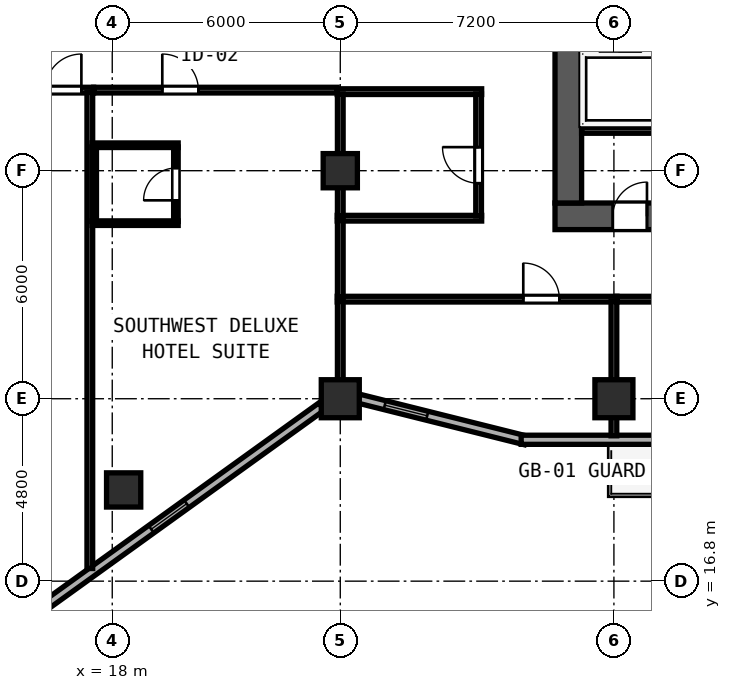
"""IFC4 building model, lengths in metres.
Left out: names, types, materials, properties, quantities, classifications, styles, units other than length and angle.
Written with IfcOpenShell. Run it as: python <this file> out.ifc"""

import sys

from ifc_helpers import new_model, si_unit, direction, frame, frame_2d, origin, origin_2d, place, context, subcontext, project, spatial, rectangle, hollow_rectangle, extrude, element, fill, save


model = new_model("IFC4")
c1 = context("Model", 3, precision=1e-05, world=origin(), true_north=direction((0.0, 1.0)))
c2 = subcontext(c1, "Body", "Model", "MODEL_VIEW")
j1 = project(units=[si_unit("LENGTHUNIT", "METRE"), si_unit("PLANEANGLEUNIT", "RADIAN")], contexts=[c1])
p1 = place(None, origin())
s1 = spatial("IfcSite", under=j1, at=p1, CompositionType="ELEMENT")
p2 = place(p1, origin())
s2 = spatial("IfcBuilding", under=s1, at=p2, CompositionType="ELEMENT")
p3 = place(p2, frame((0.0, 0.0, 113.6)))
s3 = spatial("IfcBuildingStorey", under=s2, at=p3, CompositionType="ELEMENT", Elevation=113.6)
p4 = place(p3, frame((29.65, 26.4, 0.0), z_axis=(0.0, 0.0, 1.0), x_axis=(1.0, 0.0, 0.0)))
e1 = element("IfcWall", 1, at=p4, inside=s3, PredefinedType="SHEAR", context=c2, shape_type="SweptSolid", body=[
    extrude(rectangle(XDim=17.5, YDim=0.7, at=frame_2d((8.75, 0.0))), origin(), (0.0, 0.0, 1.0), 3.6),
])
p5 = place(p4, frame((2.42, 0.0, 0.0), z_axis=(0.0, 0.0, 1.0), x_axis=(-1.0, 0.0, 0.0)))
e2 = element("IfcOpeningElement", 2, at=p5, cuts=e1, PredefinedType="OPENING", context=c2, shape_type="SweptSolid", body=[
    extrude(rectangle(XDim=0.9, YDim=2.1, at=frame_2d((0.45, 1.05))), frame((0.0, 0.36, 0.0), z_axis=(0.0, -1.0, 0.0), x_axis=(1.0, 0.0, 0.0)), (0.0, 0.0, 1.0), 0.72),
])
p6 = place(p4, frame((7.26, 0.0, 0.0), z_axis=(0.0, 0.0, 1.0), x_axis=(-1.0, 0.0, 0.0)))
e3 = element("IfcOpeningElement", 3, at=p6, cuts=e1, PredefinedType="OPENING", context=c2, shape_type="SweptSolid", body=[
    extrude(rectangle(XDim=0.9, YDim=2.1, at=frame_2d((0.45, 1.05))), frame((0.0, 0.36, 0.0), z_axis=(0.0, -1.0, 0.0), x_axis=(1.0, 0.0, 0.0)), (0.0, 0.0, 1.0), 0.72),
])
p7 = place(p4, frame((13.06, 0.0, 0.0), z_axis=(0.0, 0.0, 1.0), x_axis=(-1.0, 0.0, 0.0)))
e4 = element("IfcOpeningElement", 4, at=p7, cuts=e1, PredefinedType="OPENING", context=c2, shape_type="SweptSolid", body=[
    extrude(rectangle(XDim=0.9, YDim=2.1, at=frame_2d((0.45, 1.05))), frame((0.0, 0.36, 0.0), z_axis=(0.0, -1.0, 0.0), x_axis=(1.0, 0.0, 0.0)), (0.0, 0.0, 1.0), 0.72),
])
p8 = place(p3, frame((30.0, 26.75, 0.0), z_axis=(0.0, 0.0, 1.0), x_axis=(0.0, 1.0, 0.0)))
e5 = element("IfcWall", 5, at=p8, inside=s3, PredefinedType="SHEAR", context=c2, shape_type="SweptSolid", body=[
    extrude(rectangle(XDim=4.1, YDim=0.7, at=frame_2d((2.05, 0.0))), origin(), (0.0, 0.0, 1.0), 3.6),
])
for number, where, z_axis, x_axis in (
    (6, (24.0, 21.6, 0.0), (0.0, 0.0, 1.0), (1.0, 0.0, 0.0)),
    (7, (31.2, 21.6, 0.0), (0.0, 0.0, 1.0), (1.0, 0.0, 0.0)),
):
    element("IfcColumn", number, at=place(p3, frame(where, z_axis=z_axis, x_axis=x_axis)), inside=s3, PredefinedType="COLUMN", context=c2, shape_type="SweptSolid", body=[
        extrude(hollow_rectangle(XDim=1.0, YDim=1.0, WallThickness=0.038, at=origin_2d()), origin(), (0.0, 0.0, 1.0), 3.8),
    ])
for number, where, z_axis, x_axis in (
    (8, (24.0, 27.6, 0.0), (0.0, 0.0, 1.0), (1.0, 0.0, 0.0)),
    (9, (18.3, 19.2, 0.0), (0.0, 0.0, 1.0), (1.0, 0.0, 0.0)),
):
    element("IfcColumn", number, at=place(p3, frame(where, z_axis=z_axis, x_axis=x_axis)), inside=s3, PredefinedType="COLUMN", context=c2, shape_type="SweptSolid", body=[
        extrude(hollow_rectangle(XDim=0.9, YDim=0.9, WallThickness=0.034, at=origin_2d()), origin(), (0.0, 0.0, 1.0), 3.8),
    ])
p9 = place(p3, frame((14.075, 14.602, 0.0), z_axis=(0.0, 0.0, 1.0), x_axis=(0.811543504691, 0.584291998913, 0.0)))
e10 = element("IfcWall", 10, at=p9, inside=s3, PredefinedType="SOLIDWALL", context=c2, shape_type="SweptSolid", body=[
    extrude(rectangle(XDim=11.623, YDim=0.24, at=frame_2d((5.812, 0.0))), origin(), (0.0, 0.0, 1.0), 3.145),
])
p10 = place(p9, frame((0.7, 0.0, 0.85)))
e11 = element("IfcOpeningElement", 11, at=p10, cuts=e10, PredefinedType="OPENING", context=c2, shape_type="SweptSolid", body=[
    extrude(rectangle(XDim=1.15, YDim=1.8, at=frame_2d((0.575, 0.9))), frame((0.0, 0.13, 0.0), z_axis=(0.0, -1.0, 0.0), x_axis=(1.0, 0.0, 0.0)), (0.0, 0.0, 1.0), 0.26),
])
p11 = place(p9, frame((6.1, 0.0, 0.85)))
e12 = element("IfcOpeningElement", 12, at=p11, cuts=e10, PredefinedType="OPENING", context=c2, shape_type="SweptSolid", body=[
    extrude(rectangle(XDim=1.15, YDim=1.8, at=frame_2d((0.575, 0.9))), frame((0.0, 0.13, 0.0), z_axis=(0.0, -1.0, 0.0), x_axis=(1.0, 0.0, 0.0)), (0.0, 0.0, 1.0), 0.26),
])
p12 = place(p3, frame((24.492, 21.601, 0.0), z_axis=(0.0, 0.0, 1.0), x_axis=(0.970145683738, -0.242522890311, 0.0)))
e13 = element("IfcWall", 13, at=p12, inside=s3, PredefinedType="SOLIDWALL", context=c2, shape_type="SweptSolid", body=[
    extrude(rectangle(XDim=4.511, YDim=0.24, at=frame_2d((2.255, 0.0))), origin(), (0.0, 0.0, 1.0), 3.145),
])
p13 = place(p12, frame((0.7, 0.0, 0.85)))
e14 = element("IfcOpeningElement", 14, at=p13, cuts=e13, PredefinedType="OPENING", context=c2, shape_type="SweptSolid", body=[
    extrude(rectangle(XDim=1.15, YDim=1.8, at=frame_2d((0.575, 0.9))), frame((0.0, 0.13, 0.0), z_axis=(0.0, -1.0, 0.0), x_axis=(1.0, 0.0, 0.0)), (0.0, 0.0, 1.0), 0.26),
])
p14 = place(p3, frame((28.76, 20.52, 0.0), z_axis=(0.0, 0.0, 1.0), x_axis=(1.0, 0.0, 0.0)))
e15 = element("IfcWall", 15, at=p14, inside=s3, PredefinedType="SOLIDWALL", context=c2, shape_type="SweptSolid", body=[
    extrude(rectangle(XDim=19.281, YDim=0.24, at=frame_2d((9.64, 0.0))), origin(), (0.0, 0.0, 1.0), 3.6),
])
p15 = place(p14, frame((4.84, 0.0, 0.0), z_axis=(0.0, 0.0, 1.0), x_axis=(-1.0, 0.0, 0.0)))
e16 = element("IfcOpeningElement", 16, at=p15, cuts=e15, PredefinedType="OPENING", context=c2, shape_type="SweptSolid", body=[
    extrude(rectangle(XDim=1.2, YDim=2.15, at=frame_2d((0.6, 1.075))), frame((0.0, 0.13, 0.0), z_axis=(0.0, -1.0, 0.0), x_axis=(1.0, 0.0, 0.0)), (0.0, 0.0, 1.0), 0.26),
])
p16 = place(p3, frame((30.35, 28.66, 0.0), z_axis=(0.0, 0.0, 1.0), x_axis=(1.0, 0.0, 0.0)))
e17 = element("IfcWall", 17, at=p16, inside=s3, PredefinedType="PARTITIONING", context=c2, shape_type="SweptSolid", body=[
    extrude(rectangle(XDim=16.1, YDim=0.15, at=frame_2d((8.05, 0.0))), origin(), (0.0, 0.0, 1.0), 3.6),
])
for number, where, z_axis, x_axis in (
    (18, (23.92, 29.68, 0.0), (0.0, 0.0, 1.0), (1.0, 0.0, 0.0)),
    (19, (23.92, 26.35, 0.0), (0.0, 0.0, 1.0), (1.0, 0.0, 0.0)),
):
    element("IfcWall", number, at=place(p3, frame(where, z_axis=z_axis, x_axis=x_axis)), inside=s3, PredefinedType="PARTITIONING", context=c2, shape_type="SweptSolid", body=[
        extrude(rectangle(XDim=3.8, YDim=0.15, at=frame_2d((1.9, 0.0))), origin(), (0.0, 0.0, 1.0), 3.6),
    ])
p17 = place(p3, frame((24.0, 26.41, 0.0), z_axis=(0.0, 0.0, 1.0), x_axis=(0.0, 1.0, 0.0)))
e20 = element("IfcWall", 20, at=p17, inside=s3, PredefinedType="PARTITIONING", context=c2, shape_type="SweptSolid", body=[
    extrude(rectangle(XDim=3.21, YDim=0.15, at=frame_2d((1.605, 0.0))), origin(), (0.0, 0.0, 1.0), 3.145),
])
p18 = place(p3, frame((27.64, 26.41, 0.0), z_axis=(0.0, 0.0, 1.0), x_axis=(0.0, 1.0, 0.0)))
e21 = element("IfcWall", 21, at=p18, inside=s3, PredefinedType="PARTITIONING", context=c2, shape_type="SweptSolid", body=[
    extrude(rectangle(XDim=3.21, YDim=0.15, at=frame_2d((1.605, 0.0))), origin(), (0.0, 0.0, 1.0), 3.6),
])
p19 = place(p18, frame((1.81, 0.0, 0.0), z_axis=(0.0, 0.0, 1.0), x_axis=(-1.0, 0.0, 0.0)))
e22 = element("IfcOpeningElement", 22, at=p19, cuts=e21, PredefinedType="OPENING", context=c2, shape_type="SweptSolid", body=[
    extrude(rectangle(XDim=0.95, YDim=2.12, at=frame_2d((0.475, 1.06))), frame((0.0, 0.085, 0.0), z_axis=(0.0, -1.0, 0.0), x_axis=(1.0, 0.0, 0.0)), (0.0, 0.0, 1.0), 0.17),
])
p20 = place(p3, frame((23.92, 24.22, 0.0), z_axis=(0.0, 0.0, 1.0), x_axis=(1.0, 0.0, 0.0)))
e23 = element("IfcWall", 23, at=p20, inside=s3, PredefinedType="PARTITIONING", context=c2, shape_type="SweptSolid", body=[
    extrude(rectangle(XDim=7.36, YDim=0.15, at=frame_2d((3.68, 0.0))), origin(), (0.0, 0.0, 1.0), 3.6),
])
p21 = place(p20, frame((5.845, 0.0, 0.0), z_axis=(0.0, 0.0, 1.0), x_axis=(-1.0, 0.0, 0.0)))
e24 = element("IfcOpeningElement", 24, at=p21, cuts=e23, PredefinedType="OPENING", context=c2, shape_type="SweptSolid", body=[
    extrude(rectangle(XDim=0.95, YDim=2.12, at=frame_2d((0.475, 1.06))), frame((0.0, 0.085, 0.0), z_axis=(0.0, -1.0, 0.0), x_axis=(1.0, 0.0, 0.0)), (0.0, 0.0, 1.0), 0.17),
])
p22 = place(p3, frame((24.0, 21.819, 0.0), z_axis=(0.0, 0.0, 1.0), x_axis=(0.0, 1.0, 0.0)))
e25 = element("IfcWall", 25, at=p22, inside=s3, PredefinedType="PARTITIONING", context=c2, shape_type="SweptSolid", body=[
    extrude(rectangle(XDim=2.341, YDim=0.15, at=frame_2d((1.171, 0.0))), origin(), (0.0, 0.0, 1.0), 3.145),
])
p23 = place(p3, frame((31.2, 20.625, 0.0), z_axis=(0.0, 0.0, 1.0), x_axis=(0.0, 1.0, 0.0)))
e26 = element("IfcWall", 26, at=p23, inside=s3, PredefinedType="PARTITIONING", context=c2, shape_type="SweptSolid", body=[
    extrude(rectangle(XDim=3.535, YDim=0.15, at=frame_2d((1.768, 0.0))), origin(), (0.0, 0.0, 1.0), 3.085),
])
p24 = place(p3, frame((31.282, 24.22, 0.0), z_axis=(0.0, 0.0, 1.0), x_axis=(1.0, 0.0, 0.0)))
e27 = element("IfcWall", 27, at=p24, inside=s3, PredefinedType="PARTITIONING", context=c2, shape_type="SweptSolid", body=[
    extrude(rectangle(XDim=14.398, YDim=0.15, at=frame_2d((7.199, 0.0))), origin(), (0.0, 0.0, 1.0), 3.6),
])
p25 = place(p24, frame((7.513, 0.0, 0.0), z_axis=(0.0, 0.0, 1.0), x_axis=(-1.0, 0.0, 0.0)))
e28 = element("IfcOpeningElement", 28, at=p25, cuts=e27, PredefinedType="OPENING", context=c2, shape_type="SweptSolid", body=[
    extrude(rectangle(XDim=0.95, YDim=2.12, at=frame_2d((0.475, 1.06))), frame((0.0, 0.085, 0.0), z_axis=(0.0, -1.0, 0.0), x_axis=(1.0, 0.0, 0.0)), (0.0, 0.0, 1.0), 0.17),
])
p26 = place(p3, frame((11.7, 29.72, 0.0), z_axis=(0.0, 0.0, 1.0), x_axis=(1.0, 0.0, 0.0)))
e29 = element("IfcWall", 29, at=p26, inside=s3, PredefinedType="PARTITIONING", context=c2, shape_type="SweptSolid", body=[
    extrude(rectangle(XDim=5.81, YDim=0.15, at=frame_2d((2.905, 0.0))), origin(), (0.0, 0.0, 1.0), 3.6),
])
p27 = place(p26, frame((5.488, 0.0, 0.0), z_axis=(0.0, 0.0, 1.0), x_axis=(-1.0, 0.0, 0.0)))
e30 = element("IfcOpeningElement", 30, at=p27, cuts=e29, PredefinedType="OPENING", context=c2, shape_type="SweptSolid", body=[
    extrude(rectangle(XDim=0.95, YDim=2.18, at=frame_2d((0.475, 1.09))), frame((0.0, 0.085, 0.0), z_axis=(0.0, -1.0, 0.0), x_axis=(1.0, 0.0, 0.0)), (0.0, 0.0, 1.0), 0.17),
])
p28 = place(p3, frame((17.41, 17.133, 0.0), z_axis=(0.0, 0.0, 1.0), x_axis=(0.0, 1.0, 0.0)))
e31 = element("IfcWall", 31, at=p28, inside=s3, PredefinedType="PARTITIONING", context=c2, shape_type="SweptSolid", body=[
    extrude(rectangle(XDim=12.527, YDim=0.15, at=frame_2d((6.264, 0.0))), origin(), (0.0, 0.0, 1.0), 3.6),
])
p29 = place(p3, frame((17.512, 29.72, 0.0), z_axis=(0.0, 0.0, 1.0), x_axis=(1.0, 0.0, 0.0)))
e32 = element("IfcWall", 32, at=p29, inside=s3, PredefinedType="PARTITIONING", context=c2, shape_type="SweptSolid", body=[
    extrude(rectangle(XDim=6.406, YDim=0.15, at=frame_2d((3.203, 0.0))), origin(), (0.0, 0.0, 1.0), 3.6),
])
p30 = place(p29, frame((2.755, 0.0, 0.0), z_axis=(0.0, 0.0, 1.0), x_axis=(-1.0, 0.0, 0.0)))
e33 = element("IfcOpeningElement", 33, at=p30, cuts=e32, PredefinedType="OPENING", context=c2, shape_type="SweptSolid", body=[
    extrude(rectangle(XDim=0.95, YDim=2.18, at=frame_2d((0.475, 1.09))), frame((0.0, 0.085, 0.0), z_axis=(0.0, -1.0, 0.0), x_axis=(1.0, 0.0, 0.0)), (0.0, 0.0, 1.0), 0.17),
])
p31 = place(p3, frame((24.0, 24.28, 0.0), z_axis=(0.0, 0.0, 1.0), x_axis=(0.0, 1.0, 0.0)))
e34 = element("IfcWall", 34, at=p31, inside=s3, PredefinedType="PARTITIONING", context=c2, shape_type="SweptSolid", body=[
    extrude(rectangle(XDim=2.01, YDim=0.15, at=frame_2d((1.005, 0.0))), origin(), (0.0, 0.0, 1.0), 3.145),
])
for number, where, z_axis, x_axis in (
    (35, (17.47, 28.27, 0.0), (0.0, 0.0, 1.0), (1.0, 0.0, 0.0)),
    (36, (17.47, 26.22, 0.0), (0.0, 0.0, 1.0), (1.0, 0.0, 0.0)),
):
    element("IfcWall", number, at=place(p3, frame(where, z_axis=z_axis, x_axis=x_axis)), inside=s3, PredefinedType="PARTITIONING", context=c2, shape_type="SweptSolid", body=[
        extrude(rectangle(XDim=2.265, YDim=0.12, at=frame_2d((1.133, 0.0))), origin(), (0.0, 0.0, 1.0), 3.6),
    ])
p32 = place(p3, frame((17.525, 26.265, 0.0), z_axis=(0.0, 0.0, 1.0), x_axis=(0.0, 1.0, 0.0)))
e37 = element("IfcWall", 37, at=p32, inside=s3, PredefinedType="PARTITIONING", context=c2, shape_type="SweptSolid", body=[
    extrude(rectangle(XDim=1.96, YDim=0.12, at=frame_2d((0.98, 0.0))), origin(), (0.0, 0.0, 1.0), 3.6),
])
p33 = place(p3, frame((19.675, 26.265, 0.0), z_axis=(0.0, 0.0, 1.0), x_axis=(0.0, 1.0, 0.0)))
e38 = element("IfcWall", 38, at=p33, inside=s3, PredefinedType="PARTITIONING", context=c2, shape_type="SweptSolid", body=[
    extrude(rectangle(XDim=1.96, YDim=0.12, at=frame_2d((0.98, 0.0))), origin(), (0.0, 0.0, 1.0), 3.6),
])
p34 = place(p33, frame((0.555, 0.0, 0.0)))
e39 = element("IfcOpeningElement", 39, at=p34, cuts=e38, PredefinedType="OPENING", context=c2, shape_type="SweptSolid", body=[
    extrude(rectangle(XDim=0.85, YDim=2.1, at=frame_2d((0.425, 1.05))), frame((0.0, 0.07, 0.0), z_axis=(0.0, -1.0, 0.0), x_axis=(1.0, 0.0, 0.0)), (0.0, 0.0, 1.0), 0.14),
])
p35 = place(p11, origin())
e40 = element("IfcWindow", 40, at=p35, inside=s3, PartitioningType="SINGLE_PANEL", PredefinedType="WINDOW", context=c2, shape_type="SweptSolid", body=[
    extrude(rectangle(XDim=1.15, YDim=1.8, at=frame_2d((0.575, 0.9))), frame((0.0, 0.03, 0.0), z_axis=(0.0, -1.0, 0.0), x_axis=(1.0, 0.0, 0.0)), (0.0, 0.0, 1.0), 0.06),
])
fill(e12, e40)
p36 = place(p13, origin())
e41 = element("IfcWindow", 41, at=p36, inside=s3, PartitioningType="SINGLE_PANEL", PredefinedType="WINDOW", context=c2, shape_type="SweptSolid", body=[
    extrude(rectangle(XDim=1.15, YDim=1.8, at=frame_2d((0.575, 0.9))), frame((0.0, 0.03, 0.0), z_axis=(0.0, -1.0, 0.0), x_axis=(1.0, 0.0, 0.0)), (0.0, 0.0, 1.0), 0.06),
])
fill(e14, e41)
p37 = place(p5, origin())
e42 = element("IfcDoor", 42, at=p37, inside=s3, OperationType="SINGLE_SWING_LEFT", PredefinedType="DOOR", context=c2, shape_type="SweptSolid", body=[
    extrude(rectangle(XDim=0.9, YDim=2.1, at=frame_2d((0.45, 1.05))), frame((0.0, -0.195, 0.0), z_axis=(0.0, -1.0, 0.0), x_axis=(1.0, 0.0, 0.0)), (0.0, 0.0, 1.0), 0.05),
])
fill(e2, e42)
p38 = place(p19, origin())
e43 = element("IfcDoor", 43, at=p38, inside=s3, OperationType="SINGLE_SWING_LEFT", PredefinedType="DOOR", context=c2, shape_type="SweptSolid", body=[
    extrude(rectangle(XDim=0.95, YDim=2.12, at=frame_2d((0.475, 1.06))), frame((0.0, 0.025, 0.0), z_axis=(0.0, -1.0, 0.0), x_axis=(1.0, 0.0, 0.0)), (0.0, 0.0, 1.0), 0.05),
])
fill(e22, e43)
p39 = place(p21, origin())
e44 = element("IfcDoor", 44, at=p39, inside=s3, OperationType="SINGLE_SWING_RIGHT", PredefinedType="DOOR", context=c2, shape_type="SweptSolid", body=[
    extrude(rectangle(XDim=0.95, YDim=2.12, at=frame_2d((0.475, 1.06))), frame((0.0, 0.025, 0.0), z_axis=(0.0, -1.0, 0.0), x_axis=(1.0, 0.0, 0.0)), (0.0, 0.0, 1.0), 0.05),
])
fill(e24, e44)
p40 = place(p27, origin())
e45 = element("IfcDoor", 45, at=p40, inside=s3, OperationType="SINGLE_SWING_LEFT", PredefinedType="DOOR", context=c2, shape_type="SweptSolid", body=[
    extrude(rectangle(XDim=0.95, YDim=2.18, at=frame_2d((0.475, 1.09))), frame((0.0, 0.025, 0.0), z_axis=(0.0, -1.0, 0.0), x_axis=(1.0, 0.0, 0.0)), (0.0, 0.0, 1.0), 0.05),
])
fill(e30, e45)
p41 = place(p30, origin())
e46 = element("IfcDoor", 46, at=p41, inside=s3, OperationType="SINGLE_SWING_RIGHT", PredefinedType="DOOR", context=c2, shape_type="SweptSolid", body=[
    extrude(rectangle(XDim=0.95, YDim=2.18, at=frame_2d((0.475, 1.09))), frame((0.0, 0.025, 0.0), z_axis=(0.0, -1.0, 0.0), x_axis=(1.0, 0.0, 0.0)), (0.0, 0.0, 1.0), 0.05),
])
fill(e33, e46)
p42 = place(p34, origin())
e47 = element("IfcDoor", 47, at=p42, inside=s3, OperationType="SINGLE_SWING_LEFT", PredefinedType="DOOR", context=c2, shape_type="SweptSolid", body=[
    extrude(rectangle(XDim=0.85, YDim=2.1, at=frame_2d((0.425, 1.05))), frame((0.0, 0.025, 0.0), z_axis=(0.0, -1.0, 0.0), x_axis=(1.0, 0.0, 0.0)), (0.0, 0.0, 1.0), 0.05),
])
fill(e39, e47)
save(model, sys.argv[1])
